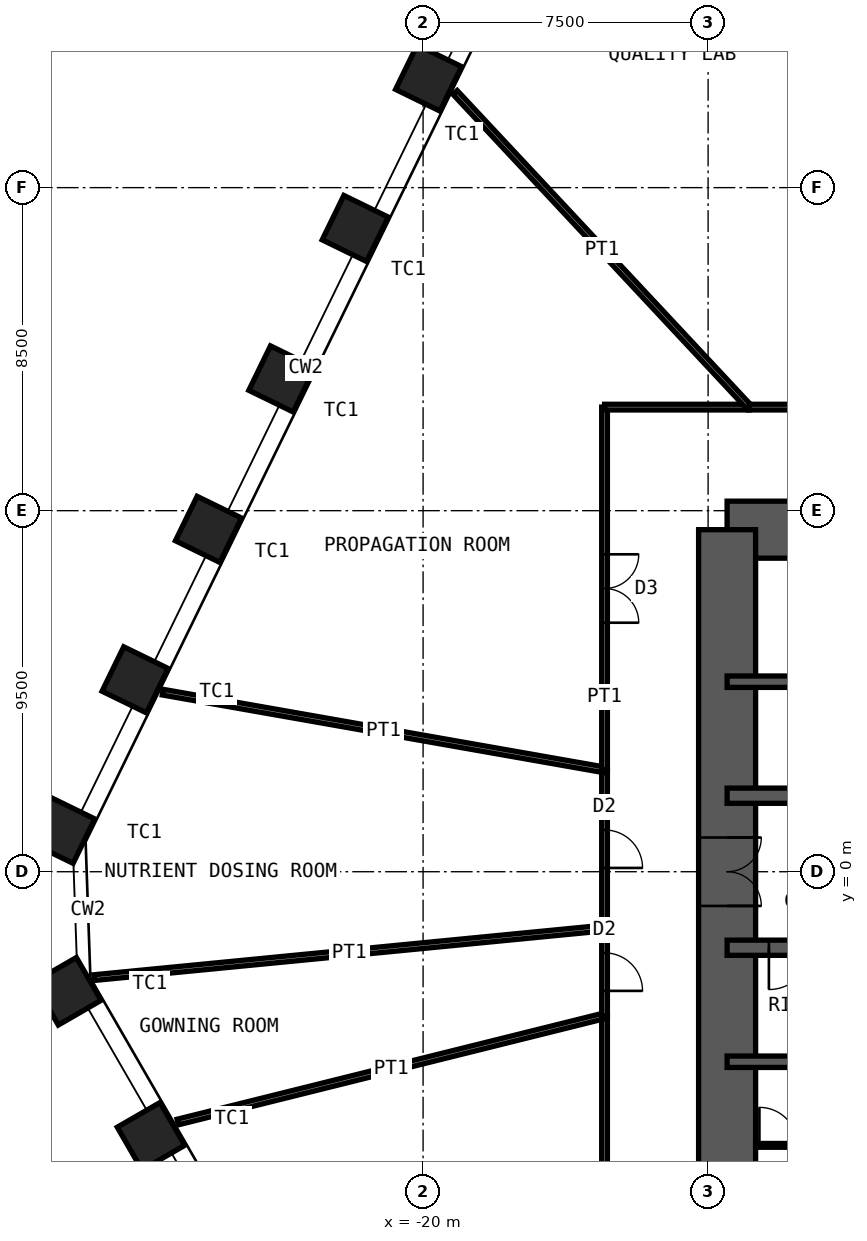
"""IFC4 building model, lengths in metres.
Left out: names, types, materials, properties, quantities, classifications, styles, units other than length and angle.
Written with IfcOpenShell. Run it as: python <this file> out.ifc"""

import sys

from ifc_helpers import new_model, si_unit, direction, frame, frame_2d, origin, origin_2d, place, context, subcontext, project, spatial, rectangle, hollow_rectangle, extrude, element, fill, save


model = new_model("IFC4")
c1 = context("Model", 3, precision=1e-05, world=origin(), true_north=direction((0.0, 1.0)))
c2 = subcontext(c1, "Body", "Model", "MODEL_VIEW")
j1 = project(units=[si_unit("LENGTHUNIT", "METRE"), si_unit("PLANEANGLEUNIT", "RADIAN")], contexts=[c1])
p1 = place(None, origin())
s1 = spatial("IfcSite", under=j1, at=p1, CompositionType="ELEMENT")
p2 = place(p1, origin())
s2 = spatial("IfcBuilding", under=s1, at=p2, CompositionType="ELEMENT")
p3 = place(p2, frame((0.0, 0.0, 27.0)))
s3 = spatial("IfcBuildingStorey", under=s2, at=p3, CompositionType="ELEMENT", Elevation=27.0)
for number, where, z_axis, x_axis in (
    (1, (-27.158, -6.96, 0.0), (0.0, 0.0, 1.0), (0.5, -0.866, 0.0)),
    (2, (-29.361, -3.146, 0.0), (0.0, 0.0, 1.0), (0.5, -0.866, 0.0)),
    (3, (-29.509, 1.09, 0.0), (0.0, 0.0, 1.0), (-0.438, -0.899, 0.0)),
    (4, (-27.578, 5.049, 0.0), (0.0, 0.0, 1.0), (-0.438, -0.899, 0.0)),
    (5, (-25.647, 9.008, 0.0), (0.0, 0.0, 1.0), (-0.438, -0.899, 0.0)),
    (6, (-23.716, 12.966, 0.0), (0.0, 0.0, 1.0), (-0.438, -0.899, 0.0)),
    (7, (-21.785, 16.925, 0.0), (0.0, 0.0, 1.0), (-0.438, -0.899, 0.0)),
    (8, (-19.854, 20.884, 0.0), (0.0, 0.0, 1.0), (-0.438, -0.899, 0.0)),
):
    element("IfcColumn", number, at=place(p3, frame(where, z_axis=z_axis, x_axis=x_axis)), inside=s3, PredefinedType="COLUMN", context=c2, shape_type="SweptSolid", body=[
        extrude(hollow_rectangle(XDim=1.3, YDim=1.3, WallThickness=0.1, at=origin_2d()), origin(), (0.0, 0.0, 1.0), 5.0),
    ])
p4 = place(p3, frame((-12.0, 9.0, 0.0), z_axis=(0.0, 0.0, 1.0), x_axis=(1.0, 0.0, 0.0)))
e9 = element("IfcWall", 9, at=p4, inside=s3, PredefinedType="SHEAR", context=c2, shape_type="SweptSolid", body=[
    extrude(rectangle(XDim=24.0, YDim=1.5, at=frame_2d((12.0, 0.0))), origin(), (0.0, 0.0, 1.0), 5.0),
])
p5 = place(p4, frame((10.4, 0.0, 0.0)))
e10 = element("IfcOpeningElement", 10, at=p5, cuts=e9, PredefinedType="OPENING", context=c2, shape_type="SweptSolid", body=[
    extrude(rectangle(XDim=1.0, YDim=2.1, at=frame_2d((0.5, 1.05))), frame((0.0, 0.76, 0.0), z_axis=(0.0, -1.0, 0.0), x_axis=(1.0, 0.0, 0.0)), (0.0, 0.0, 1.0), 1.52),
])
p6 = place(p4, frame((17.6, 0.0, 0.0)))
e11 = element("IfcOpeningElement", 11, at=p6, cuts=e9, PredefinedType="OPENING", context=c2, shape_type="SweptSolid", body=[
    extrude(rectangle(XDim=0.9, YDim=2.1, at=frame_2d((0.45, 1.05))), frame((0.0, 0.76, 0.0), z_axis=(0.0, -1.0, 0.0), x_axis=(1.0, 0.0, 0.0)), (0.0, 0.0, 1.0), 1.52),
])
p7 = place(p4, frame((21.9, 0.0, 0.0)))
e12 = element("IfcOpeningElement", 12, at=p7, cuts=e9, PredefinedType="OPENING", context=c2, shape_type="SweptSolid", body=[
    extrude(rectangle(XDim=0.9, YDim=2.1, at=frame_2d((0.45, 1.05))), frame((0.0, 0.76, 0.0), z_axis=(0.0, -1.0, 0.0), x_axis=(1.0, 0.0, 0.0)), (0.0, 0.0, 1.0), 1.52),
])
p8 = place(p3, frame((-12.0, -9.0, 0.0), z_axis=(0.0, 0.0, 1.0), x_axis=(0.0, 1.0, 0.0)))
e13 = element("IfcWall", 13, at=p8, inside=s3, PredefinedType="SHEAR", context=c2, shape_type="SweptSolid", body=[
    extrude(rectangle(XDim=18.0, YDim=1.5, at=frame_2d((9.0, 0.0))), origin(), (0.0, 0.0, 1.0), 5.0),
])
p9 = place(p8, frame((8.1, 0.0, 0.0)))
e14 = element("IfcOpeningElement", 14, at=p9, cuts=e13, PredefinedType="OPENING", context=c2, shape_type="SweptSolid", body=[
    extrude(rectangle(XDim=1.8, YDim=2.1, at=frame_2d((0.9, 1.05))), frame((0.0, 0.76, 0.0), z_axis=(0.0, -1.0, 0.0), x_axis=(1.0, 0.0, 0.0)), (0.0, 0.0, 1.0), 1.52),
])
p10 = place(p3, frame((-12.0, 5.0, 0.0), z_axis=(0.0, 0.0, 1.0), x_axis=(1.0, 0.0, 0.0)))
e15 = element("IfcWall", 15, at=p10, inside=s3, PredefinedType="SHEAR", context=c2, shape_type="SweptSolid", body=[
    extrude(rectangle(XDim=24.0, YDim=0.3, at=frame_2d((12.0, 0.0))), origin(), (0.0, 0.0, 1.0), 5.0),
])
p11 = place(p3, frame((-12.0, 2.0, 0.0), z_axis=(0.0, 0.0, 1.0), x_axis=(1.0, 0.0, 0.0)))
e16 = element("IfcWall", 16, at=p11, inside=s3, PredefinedType="SHEAR", context=c2, shape_type="SweptSolid", body=[
    extrude(rectangle(XDim=24.0, YDim=0.4, at=frame_2d((12.0, 0.0))), origin(), (0.0, 0.0, 1.0), 5.0),
])
p12 = place(p11, frame((2.4, 0.0, 0.0)))
e17 = element("IfcOpeningElement", 17, at=p12, cuts=e16, PredefinedType="OPENING", context=c2, shape_type="SweptSolid", body=[
    extrude(rectangle(XDim=1.1, YDim=2.1, at=frame_2d((0.55, 1.05))), frame((0.0, 0.21, 0.0), z_axis=(0.0, -1.0, 0.0), x_axis=(1.0, 0.0, 0.0)), (0.0, 0.0, 1.0), 0.42),
])
p13 = place(p11, frame((22.0, 0.0, 0.0)))
e18 = element("IfcOpeningElement", 18, at=p13, cuts=e16, PredefinedType="OPENING", context=c2, shape_type="SweptSolid", body=[
    extrude(rectangle(XDim=1.1, YDim=2.1, at=frame_2d((0.55, 1.05))), frame((0.0, 0.21, 0.0), z_axis=(0.0, -1.0, 0.0), x_axis=(1.0, 0.0, 0.0)), (0.0, 0.0, 1.0), 0.42),
])
p14 = place(p11, frame((10.15, 0.0, 0.0)))
e19 = element("IfcOpeningElement", 19, at=p14, cuts=e16, PredefinedType="OPENING", context=c2, shape_type="SweptSolid", body=[
    extrude(rectangle(XDim=1.0, YDim=2.1, at=frame_2d((0.5, 1.05))), frame((0.0, 0.21, 0.0), z_axis=(0.0, -1.0, 0.0), x_axis=(1.0, 0.0, 0.0)), (0.0, 0.0, 1.0), 0.42),
])
p15 = place(p11, frame((6.7, 0.0, 0.0)))
e20 = element("IfcOpeningElement", 20, at=p15, cuts=e16, PredefinedType="OPENING", context=c2, shape_type="SweptSolid", body=[
    extrude(rectangle(XDim=1.4, YDim=2.4, at=frame_2d((0.7, 1.2))), frame((0.0, 0.21, 0.0), z_axis=(0.0, -1.0, 0.0), x_axis=(1.0, 0.0, 0.0)), (0.0, 0.0, 1.0), 0.42),
])
p16 = place(p11, frame((13.35, 0.0, 0.0)))
e21 = element("IfcOpeningElement", 21, at=p16, cuts=e16, PredefinedType="OPENING", context=c2, shape_type="SweptSolid", body=[
    extrude(rectangle(XDim=1.1, YDim=2.4, at=frame_2d((0.55, 1.2))), frame((0.0, 0.21, 0.0), z_axis=(0.0, -1.0, 0.0), x_axis=(1.0, 0.0, 0.0)), (0.0, 0.0, 1.0), 0.42),
])
p17 = place(p11, frame((16.15, 0.0, 0.0)))
e22 = element("IfcOpeningElement", 22, at=p17, cuts=e16, PredefinedType="OPENING", context=c2, shape_type="SweptSolid", body=[
    extrude(rectangle(XDim=1.1, YDim=2.4, at=frame_2d((0.55, 1.2))), frame((0.0, 0.21, 0.0), z_axis=(0.0, -1.0, 0.0), x_axis=(1.0, 0.0, 0.0)), (0.0, 0.0, 1.0), 0.42),
])
p18 = place(p11, frame((18.95, 0.0, 0.0)))
e23 = element("IfcOpeningElement", 23, at=p18, cuts=e16, PredefinedType="OPENING", context=c2, shape_type="SweptSolid", body=[
    extrude(rectangle(XDim=1.1, YDim=2.4, at=frame_2d((0.55, 1.2))), frame((0.0, 0.21, 0.0), z_axis=(0.0, -1.0, 0.0), x_axis=(1.0, 0.0, 0.0)), (0.0, 0.0, 1.0), 0.42),
])
p19 = place(p3, frame((-12.0, -2.0, 0.0), z_axis=(0.0, 0.0, 1.0), x_axis=(1.0, 0.0, 0.0)))
e24 = element("IfcWall", 24, at=p19, inside=s3, PredefinedType="SHEAR", context=c2, shape_type="SweptSolid", body=[
    extrude(rectangle(XDim=24.0, YDim=0.4, at=frame_2d((12.0, 0.0))), origin(), (0.0, 0.0, 1.0), 5.0),
])
p20 = place(p19, frame((1.1, 0.0, 0.0)))
e25 = element("IfcOpeningElement", 25, at=p20, cuts=e24, PredefinedType="OPENING", context=c2, shape_type="SweptSolid", body=[
    extrude(rectangle(XDim=1.1, YDim=2.1, at=frame_2d((0.55, 1.05))), frame((0.0, 0.21, 0.0), z_axis=(0.0, -1.0, 0.0), x_axis=(1.0, 0.0, 0.0)), (0.0, 0.0, 1.0), 0.42),
])
p21 = place(p19, frame((13.55, 0.0, 0.0)))
e26 = element("IfcOpeningElement", 26, at=p21, cuts=e24, PredefinedType="OPENING", context=c2, shape_type="SweptSolid", body=[
    extrude(rectangle(XDim=1.1, YDim=2.1, at=frame_2d((0.55, 1.05))), frame((0.0, 0.21, 0.0), z_axis=(0.0, -1.0, 0.0), x_axis=(1.0, 0.0, 0.0)), (0.0, 0.0, 1.0), 0.42),
])
p22 = place(p19, frame((20.7, 0.0, 0.0)))
e27 = element("IfcOpeningElement", 27, at=p22, cuts=e24, PredefinedType="OPENING", context=c2, shape_type="SweptSolid", body=[
    extrude(rectangle(XDim=1.1, YDim=2.1, at=frame_2d((0.55, 1.05))), frame((0.0, 0.21, 0.0), z_axis=(0.0, -1.0, 0.0), x_axis=(1.0, 0.0, 0.0)), (0.0, 0.0, 1.0), 0.42),
])
p23 = place(p3, frame((-12.0, -5.0, 0.0), z_axis=(0.0, 0.0, 1.0), x_axis=(1.0, 0.0, 0.0)))
e28 = element("IfcWall", 28, at=p23, inside=s3, PredefinedType="SHEAR", context=c2, shape_type="SweptSolid", body=[
    extrude(rectangle(XDim=24.0, YDim=0.3, at=frame_2d((12.0, 0.0))), origin(), (0.0, 0.0, 1.0), 5.0),
])
p24 = place(p3, frame((-11.25, -7.2, 0.0), z_axis=(0.0, 0.0, 1.0), x_axis=(1.0, 0.0, 0.0)))
e29 = element("IfcWall", 29, at=p24, inside=s3, PredefinedType="PARTITIONING", context=c2, shape_type="SweptSolid", body=[
    extrude(rectangle(XDim=2.9, YDim=0.1, at=frame_2d((1.45, 0.0))), origin(), (0.0, 0.0, 1.0), 4.78),
])
p25 = place(p24, frame((0.1, 0.0, 0.0)))
e30 = element("IfcOpeningElement", 30, at=p25, cuts=e29, PredefinedType="OPENING", context=c2, shape_type="SweptSolid", body=[
    extrude(rectangle(XDim=1.0, YDim=2.4, at=frame_2d((0.5, 1.2))), frame((0.0, 0.06, 0.0), z_axis=(0.0, -1.0, 0.0), x_axis=(1.0, 0.0, 0.0)), (0.0, 0.0, 1.0), 0.12),
])
p26 = place(p3, frame((-15.225, -12.225, 0.0), z_axis=(0.0, 0.0, 1.0), x_axis=(0.0, 1.0, 0.0)))
e31 = element("IfcWall", 31, at=p26, inside=s3, PredefinedType="PARTITIONING", context=c2, shape_type="SweptSolid", body=[
    extrude(rectangle(XDim=8.435, YDim=0.15, at=frame_2d((4.217, 0.0))), origin(), (0.0, 0.0, 1.0), 4.8),
])
p27 = place(p3, frame((-26.455, -6.586, 0.0), z_axis=(0.0, 0.0, 1.0), x_axis=(0.970383998101, 0.241567581083, 0.0)))
e32 = element("IfcWall", 32, at=p27, inside=s3, PredefinedType="PARTITIONING", context=c2, shape_type="SweptSolid", body=[
    extrude(rectangle(XDim=11.573, YDim=0.15, at=frame_2d((5.787, 0.0))), origin(), (0.0, 0.0, 1.0), 3.7),
])
p28 = place(p3, frame((-15.225, -3.79, 0.0), z_axis=(0.0, 0.0, 1.0), x_axis=(0.0, 1.0, 0.0)))
e33 = element("IfcWall", 33, at=p28, inside=s3, PredefinedType="PARTITIONING", context=c2, shape_type="SweptSolid", body=[
    extrude(rectangle(XDim=2.31, YDim=0.15, at=frame_2d((1.155, 0.0))), origin(), (0.0, 0.0, 1.0), 4.8),
])
p29 = place(p28, frame((0.655, 0.0, 0.0)))
e34 = element("IfcOpeningElement", 34, at=p29, cuts=e33, PredefinedType="OPENING", context=c2, shape_type="SweptSolid", body=[
    extrude(rectangle(XDim=1.0, YDim=2.4, at=frame_2d((0.5, 1.2))), frame((0.0, 0.085, 0.0), z_axis=(0.0, -1.0, 0.0), x_axis=(1.0, 0.0, 0.0)), (0.0, 0.0, 1.0), 0.17),
])
p30 = place(p3, frame((-28.655, -2.786, 0.0), z_axis=(0.0, 0.0, 1.0), x_axis=(0.995307331187, 0.096764231438, 0.0)))
e35 = element("IfcWall", 35, at=p30, inside=s3, PredefinedType="PARTITIONING", context=c2, shape_type="SweptSolid", body=[
    extrude(rectangle(XDim=13.493, YDim=0.15, at=frame_2d((6.747, 0.0))), origin(), (0.0, 0.0, 1.0), 3.7),
])
p31 = place(p3, frame((-15.225, -1.48, 0.0), z_axis=(0.0, 0.0, 1.0), x_axis=(0.0, 1.0, 0.0)))
e36 = element("IfcWall", 36, at=p31, inside=s3, PredefinedType="PARTITIONING", context=c2, shape_type="SweptSolid", body=[
    extrude(rectangle(XDim=4.159, YDim=0.15, at=frame_2d((2.08, 0.0))), origin(), (0.0, 0.0, 1.0), 4.8),
])
p32 = place(p31, frame((1.58, 0.0, 0.0)))
e37 = element("IfcOpeningElement", 37, at=p32, cuts=e36, PredefinedType="OPENING", context=c2, shape_type="SweptSolid", body=[
    extrude(rectangle(XDim=1.0, YDim=2.4, at=frame_2d((0.5, 1.2))), frame((0.0, 0.085, 0.0), z_axis=(0.0, -1.0, 0.0), x_axis=(1.0, 0.0, 0.0)), (0.0, 0.0, 1.0), 0.17),
])
p33 = place(p3, frame((-26.85, 4.725, 0.0), z_axis=(0.0, 0.0, 1.0), x_axis=(0.984867773441, -0.173307440223, 0.0)))
e38 = element("IfcWall", 38, at=p33, inside=s3, PredefinedType="PARTITIONING", context=c2, shape_type="SweptSolid", body=[
    extrude(rectangle(XDim=11.804, YDim=0.15, at=frame_2d((5.902, 0.0))), origin(), (0.0, 0.0, 1.0), 3.7),
])
p34 = place(p3, frame((-15.225, 2.679, 0.0), z_axis=(0.0, 0.0, 1.0), x_axis=(0.0, 1.0, 0.0)))
e39 = element("IfcWall", 39, at=p34, inside=s3, PredefinedType="PARTITIONING", context=c2, shape_type="SweptSolid", body=[
    extrude(rectangle(XDim=9.546, YDim=0.15, at=frame_2d((4.773, 0.0))), origin(), (0.0, 0.0, 1.0), 4.8),
])
p35 = place(p34, frame((3.873, 0.0, 0.0)))
e40 = element("IfcOpeningElement", 40, at=p35, cuts=e39, PredefinedType="OPENING", context=c2, shape_type="SweptSolid", body=[
    extrude(rectangle(XDim=1.8, YDim=2.4, at=frame_2d((0.9, 1.2))), frame((0.0, 0.085, 0.0), z_axis=(0.0, -1.0, 0.0), x_axis=(1.0, 0.0, 0.0)), (0.0, 0.0, 1.0), 0.17),
])
p36 = place(p3, frame((-15.225, 12.225, 0.0), z_axis=(0.0, 0.0, 1.0), x_axis=(1.0, 0.0, 0.0)))
e41 = element("IfcWall", 41, at=p36, inside=s3, PredefinedType="PARTITIONING", context=c2, shape_type="SweptSolid", body=[
    extrude(rectangle(XDim=3.803, YDim=0.15, at=frame_2d((1.902, 0.0))), origin(), (0.0, 0.0, 1.0), 4.8),
])
p37 = place(p3, frame((-19.157, 20.504, 0.0), z_axis=(0.0, 0.0, 1.0), x_axis=(0.682695116082, -0.730703345057, 0.0)))
e42 = element("IfcWall", 42, at=p37, inside=s3, PredefinedType="PARTITIONING", context=c2, shape_type="SweptSolid", body=[
    extrude(rectangle(XDim=11.33, YDim=0.15, at=frame_2d((5.665, 0.0))), origin(), (0.0, 0.0, 1.0), 3.7),
])
p38 = place(p3, frame((-11.422, 12.225, 0.0), z_axis=(0.0, 0.0, 1.0), x_axis=(1.0, 0.0, 0.0)))
e43 = element("IfcWall", 43, at=p38, inside=s3, PredefinedType="PARTITIONING", context=c2, shape_type="SweptSolid", body=[
    extrude(rectangle(XDim=6.742, YDim=0.15, at=frame_2d((3.371, 0.0))), origin(), (0.0, 0.0, 1.0), 4.8),
])
p39 = place(p38, frame((2.871, 0.0, 0.0)))
e44 = element("IfcOpeningElement", 44, at=p39, cuts=e43, PredefinedType="OPENING", context=c2, shape_type="SweptSolid", body=[
    extrude(rectangle(XDim=1.0, YDim=2.4, at=frame_2d((0.5, 1.2))), frame((0.0, 0.085, 0.0), z_axis=(0.0, -1.0, 0.0), x_axis=(1.0, 0.0, 0.0)), (0.0, 0.0, 1.0), 0.17),
])
p40 = place(p20, origin())
e45 = element("IfcDoor", 45, at=p40, inside=s3, OperationType="SINGLE_SWING_LEFT", PredefinedType="DOOR", context=c2, shape_type="SweptSolid", body=[
    extrude(rectangle(XDim=1.1, YDim=2.1, at=frame_2d((0.55, 1.05))), frame((0.0, 0.025, 0.0), z_axis=(0.0, -1.0, 0.0), x_axis=(1.0, 0.0, 0.0)), (0.0, 0.0, 1.0), 0.05),
])
fill(e25, e45)
p41 = place(p9, origin())
e46 = element("IfcDoor", 46, at=p41, inside=s3, OperationType="DOUBLE_DOOR_DOUBLE_SWING", PredefinedType="DOOR", context=c2, shape_type="SweptSolid", body=[
    extrude(rectangle(XDim=1.8, YDim=2.1, at=frame_2d((0.9, 1.05))), frame((0.0, 0.025, 0.0), z_axis=(0.0, -1.0, 0.0), x_axis=(1.0, 0.0, 0.0)), (0.0, 0.0, 1.0), 0.05),
])
fill(e14, e46)
p42 = place(p25, origin())
e47 = element("IfcDoor", 47, at=p42, inside=s3, OperationType="SINGLE_SWING_RIGHT", PredefinedType="DOOR", context=c2, shape_type="SweptSolid", body=[
    extrude(rectangle(XDim=1.0, YDim=2.4, at=frame_2d((0.5, 1.2))), frame((0.0, 0.025, 0.0), z_axis=(0.0, -1.0, 0.0), x_axis=(1.0, 0.0, 0.0)), (0.0, 0.0, 1.0), 0.05),
])
fill(e30, e47)
p43 = place(p29, origin())
e48 = element("IfcDoor", 48, at=p43, inside=s3, OperationType="SINGLE_SWING_LEFT", PredefinedType="DOOR", context=c2, shape_type="SweptSolid", body=[
    extrude(rectangle(XDim=1.0, YDim=2.4, at=frame_2d((0.5, 1.2))), frame((0.0, 0.025, 0.0), z_axis=(0.0, -1.0, 0.0), x_axis=(1.0, 0.0, 0.0)), (0.0, 0.0, 1.0), 0.05),
])
fill(e34, e48)
p44 = place(p32, origin())
e49 = element("IfcDoor", 49, at=p44, inside=s3, OperationType="SINGLE_SWING_LEFT", PredefinedType="DOOR", context=c2, shape_type="SweptSolid", body=[
    extrude(rectangle(XDim=1.0, YDim=2.4, at=frame_2d((0.5, 1.2))), frame((0.0, 0.025, 0.0), z_axis=(0.0, -1.0, 0.0), x_axis=(1.0, 0.0, 0.0)), (0.0, 0.0, 1.0), 0.05),
])
fill(e37, e49)
p45 = place(p35, origin())
e50 = element("IfcDoor", 50, at=p45, inside=s3, OperationType="DOUBLE_DOOR_DOUBLE_SWING", PredefinedType="DOOR", context=c2, shape_type="SweptSolid", body=[
    extrude(rectangle(XDim=1.8, YDim=2.4, at=frame_2d((0.9, 1.2))), frame((0.0, 0.025, 0.0), z_axis=(0.0, -1.0, 0.0), x_axis=(1.0, 0.0, 0.0)), (0.0, 0.0, 1.0), 0.05),
])
fill(e40, e50)
save(model, sys.argv[1])
